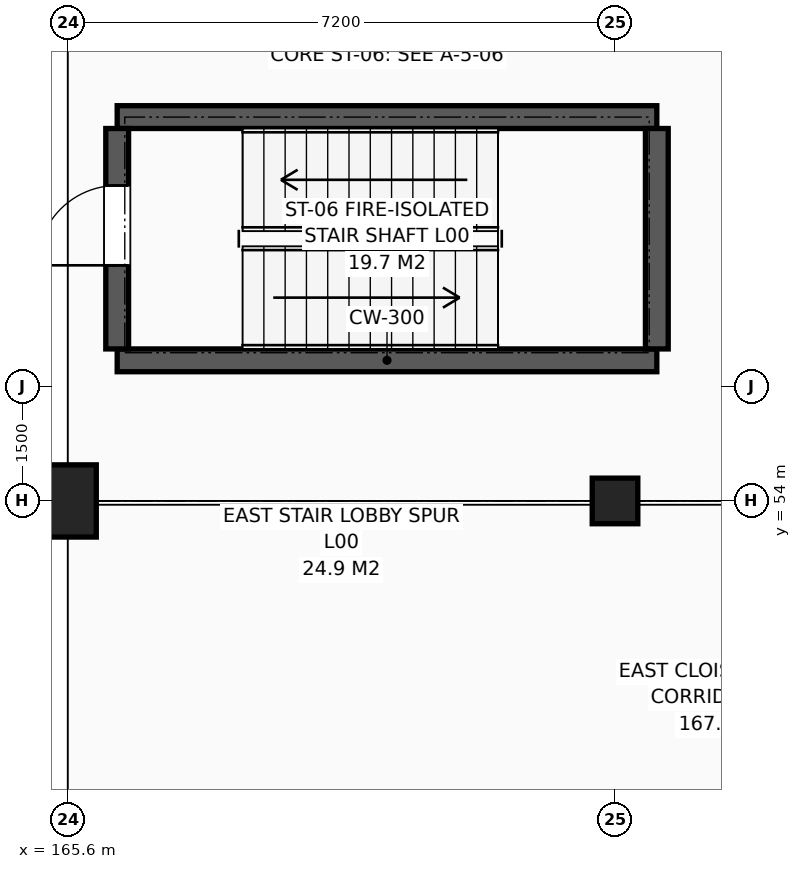
"""IFC4 building model, lengths in metres.
Left out: names, types, materials, properties, quantities, classifications, styles, units other than length and angle.
Written with IfcOpenShell. Run it as: python <this file> out.ifc"""

import sys

from ifc_helpers import new_model, si_unit, direction, frame, frame_2d, origin, origin_2d, place, context, subcontext, project, spatial, rectangle, extrude, element, fill, save


model = new_model("IFC4")
c1 = context("Model", 3, precision=1e-05, world=origin(), true_north=direction((0.0, 1.0)))
c2 = subcontext(c1, "Body", "Model", "MODEL_VIEW")
j1 = project(units=[si_unit("LENGTHUNIT", "METRE"), si_unit("PLANEANGLEUNIT", "RADIAN")], contexts=[c1])
p1 = place(None, origin())
s1 = spatial("IfcSite", under=j1, at=p1, CompositionType="ELEMENT")
p2 = place(p1, origin())
s2 = spatial("IfcBuilding", under=s1, at=p2, CompositionType="ELEMENT")
p3 = place(p2, origin())
s3 = spatial("IfcBuildingStorey", under=s2, at=p3, CompositionType="ELEMENT", Elevation=0.0)
p4 = place(p3, frame((165.6, 54.0, 0.0), z_axis=(0.0, 0.0, 1.0), x_axis=(1.0, 0.0, 0.0)))
e1 = element("IfcColumn", 1, at=p4, inside=s3, PredefinedType="COLUMN", context=c2, shape_type="SweptSolid", body=[
    extrude(rectangle(XDim=0.75, YDim=0.95, at=origin_2d()), origin(), (0.0, 0.0, 1.0), 4.8),
])
p5 = place(p3, frame((172.8, 54.0, 0.0), z_axis=(0.0, 0.0, 1.0), x_axis=(1.0, 0.0, 0.0)))
e2 = element("IfcColumn", 2, at=p5, inside=s3, PredefinedType="COLUMN", context=c2, shape_type="SweptSolid", body=[
    extrude(rectangle(XDim=0.6, YDim=0.6, at=origin_2d()), origin(), (0.0, 0.0, 1.0), 4.8),
])
for number, where, z_axis, x_axis in (
    (3, (166.25, 55.85, 0.0), (0.0, 0.0, 1.0), (1.0, 0.0, 0.0)),
    (4, (173.35, 59.05, 0.0), (0.0, 0.0, 1.0), (-1.0, 0.0, 0.0)),
):
    element("IfcWall", number, at=place(p3, frame(where, z_axis=z_axis, x_axis=x_axis)), inside=s3, PredefinedType="SHEAR", context=c2, shape_type="SweptSolid", body=[
        extrude(rectangle(XDim=7.1, YDim=0.3, at=frame_2d((3.55, 0.0))), origin(), (0.0, 0.0, 1.0), 4.525),
    ])
p6 = place(p3, frame((173.35, 56.0, 0.0), z_axis=(0.0, 0.0, 1.0), x_axis=(0.0, 1.0, 0.0)))
e5 = element("IfcWall", 5, at=p6, inside=s3, PredefinedType="SHEAR", context=c2, shape_type="SweptSolid", body=[
    extrude(rectangle(XDim=2.9, YDim=0.3, at=frame_2d((1.45, 0.0))), origin(), (0.0, 0.0, 1.0), 4.525),
])
p7 = place(p3, frame((166.25, 58.9, 0.0), z_axis=(0.0, 0.0, 1.0), x_axis=(0.0, -1.0, 0.0)))
e6 = element("IfcWall", 6, at=p7, inside=s3, PredefinedType="SHEAR", context=c2, shape_type="SweptSolid", body=[
    extrude(rectangle(XDim=2.9, YDim=0.3, at=frame_2d((1.45, 0.0))), origin(), (0.0, 0.0, 1.0), 4.525),
])
p8 = place(p7, frame((0.75, 0.0, 0.0)))
e7 = element("IfcOpeningElement", 7, at=p8, cuts=e6, PredefinedType="OPENING", context=c2, shape_type="SweptSolid", body=[
    extrude(rectangle(XDim=1.05, YDim=2.15, at=frame_2d((0.525, 1.075))), frame((0.0, 0.16, 0.0), z_axis=(0.0, -1.0, 0.0), x_axis=(1.0, 0.0, 0.0)), (0.0, 0.0, 1.0), 0.32),
])
p9 = place(p8, frame((1.05, 0.0, 0.0), z_axis=(0.0, 0.0, 1.0), x_axis=(-1.0, 0.0, 0.0)))
e8 = element("IfcDoor", 8, at=p9, inside=s3, OperationType="SINGLE_SWING_LEFT", PredefinedType="DOOR", context=c2, shape_type="SweptSolid", body=[
    extrude(rectangle(XDim=1.05, YDim=2.15, at=frame_2d((0.525, 1.075))), frame((0.0, 0.025, 0.0), z_axis=(0.0, -1.0, 0.0), x_axis=(1.0, 0.0, 0.0)), (0.0, 0.0, 1.0), 0.05),
])
fill(e7, e8)
save(model, sys.argv[1])
